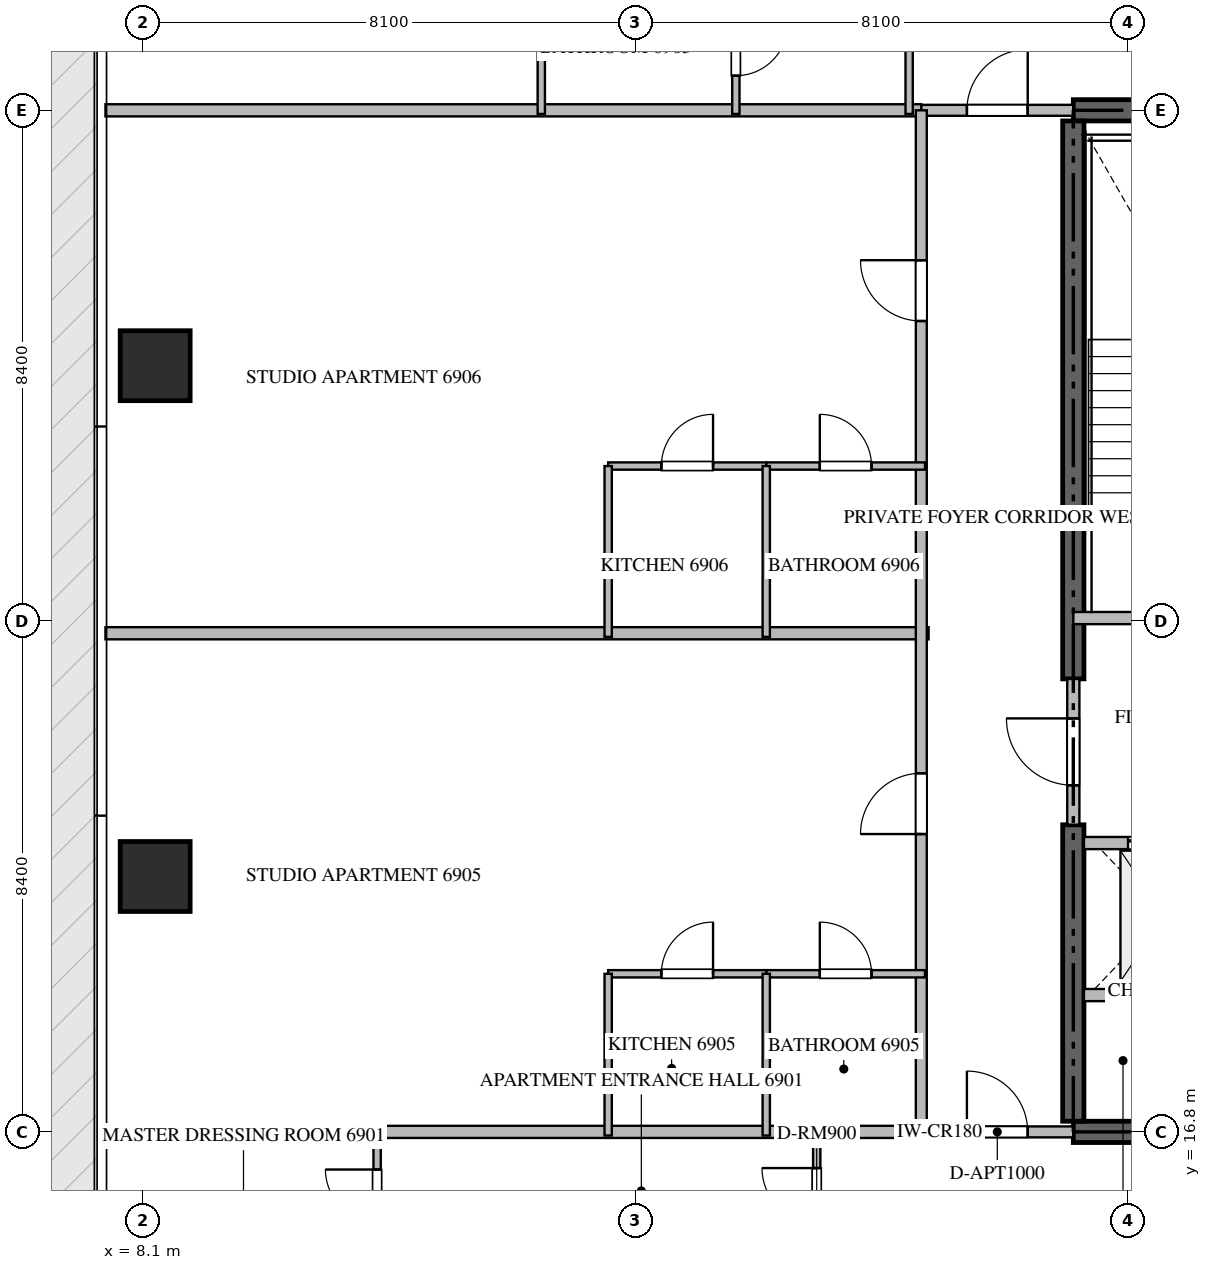
"""IFC4 building model, lengths in metres.
Left out: names, types, materials, properties, quantities, classifications, styles, units other than length and angle.
Written with IfcOpenShell. Run it as: python <this file> out.ifc"""

import sys

from ifc_helpers import new_model, si_unit, direction, frame, frame_2d, origin, origin_2d, place, context, subcontext, project, spatial, rectangle, extrude, source, transform, mapped, element, fill, save


model = new_model("IFC4")
c1 = context("Model", 3, precision=1e-05, world=origin(), true_north=direction((0.0, 1.0)))
c2 = subcontext(c1, "Body", "Model", "MODEL_VIEW")
j1 = project(units=[si_unit("LENGTHUNIT", "METRE"), si_unit("PLANEANGLEUNIT", "RADIAN")], contexts=[c1])
p1 = place(None, origin())
s1 = spatial("IfcSite", under=j1, at=p1, CompositionType="ELEMENT")
p2 = place(p1, origin())
s2 = spatial("IfcBuilding", under=s1, at=p2, CompositionType="ELEMENT")
p3 = place(p2, frame((0.0, 0.0, 275.9)))
s3 = spatial("IfcBuildingStorey", under=s2, at=p3, CompositionType="ELEMENT", Elevation=275.9)
for number, where, z_axis, x_axis in (
    (1, (23.4, 16.8, -0.26), (0.0, 0.0, 1.0), (1.0, 0.0, 0.0)),
    (2, (41.4, 33.6, -0.26), (0.0, 0.0, 1.0), (-1.0, 0.0, 0.0)),
):
    element("IfcWall", number, at=place(p3, frame(where, z_axis=z_axis, x_axis=x_axis)), inside=s3, PredefinedType="SHEAR", context=c2, shape_type="SweptSolid", body=[
        extrude(rectangle(XDim=18.0, YDim=0.35, at=frame_2d((9.0, 0.0))), origin(), (0.0, 0.0, 1.0), 3.848),
    ])
p4 = place(p3, frame((23.4, 16.975, -0.26), z_axis=(0.0, 0.0, 1.0), x_axis=(0.0, 1.0, 0.0)))
e3 = element("IfcWall", 3, at=p4, inside=s3, PredefinedType="SHEAR", context=c2, shape_type="SweptSolid", body=[
    extrude(rectangle(XDim=4.875, YDim=0.35, at=frame_2d((2.438, 0.0))), origin(), (0.0, 0.0, 1.0), 3.848),
])
p5 = place(p3, frame((23.4, 24.25, -0.26), z_axis=(0.0, 0.0, 1.0), x_axis=(0.0, 1.0, 0.0)))
e4 = element("IfcWall", 4, at=p5, inside=s3, PredefinedType="SHEAR", context=c2, shape_type="SweptSolid", body=[
    extrude(rectangle(XDim=9.175, YDim=0.35, at=frame_2d((4.587, 0.0))), origin(), (0.0, 0.0, 1.0), 3.848),
])
m1 = source(origin(), c2, "Body", "SweptSolid", [
    extrude(rectangle(XDim=1.15, YDim=1.15, at=origin_2d()), origin(), (0.0, 0.0, 1.0), 3.85),
])
for number, where, z_axis, x_axis in (
    (5, (8.3, 21.0, -0.26), (0.0, 0.0, 1.0), (1.0, 0.0, 0.0)),
    (6, (8.3, 29.4, -0.26), (0.0, 0.0, 1.0), (1.0, 0.0, 0.0)),
):
    element("IfcColumn", number, at=place(p3, frame(where, z_axis=z_axis, x_axis=x_axis)), inside=s3, PredefinedType="COLUMN", context=c2, shape_type="MappedRepresentation", body=[
        mapped(m1, transform((0.0, 0.0, 0.0), scale=1.0)),
    ])
p6 = place(p3, frame((23.4, 25.25, 0.0), z_axis=(0.0, 0.0, 1.0), x_axis=(1.0, 0.0, 0.0)))
e7 = element("IfcWall", 7, at=p6, inside=s3, PredefinedType="STANDARD", context=c2, shape_type="SweptSolid", body=[
    extrude(rectangle(XDim=4.45, YDim=0.2, at=frame_2d((2.225, 0.0))), origin(), (0.0, 0.0, 1.0), 3.59),
])
p7 = place(p6, frame((1.65, 0.0, 0.0)))
e8 = element("IfcOpeningElement", 8, at=p7, cuts=e7, PredefinedType="OPENING", context=c2, shape_type="SweptSolid", body=[
    extrude(rectangle(XDim=1.1, YDim=2.15, at=frame_2d((0.55, 1.075))), frame((0.0, 0.11, 0.0), z_axis=(0.0, -1.0, 0.0), x_axis=(1.0, 0.0, 0.0)), (0.0, 0.0, 1.0), 0.22),
])
p8 = place(p3, frame((23.575, 21.55, 0.0), z_axis=(0.0, 0.0, 1.0), x_axis=(1.0, 0.0, 0.0)))
e9 = element("IfcWall", 9, at=p8, inside=s3, PredefinedType="STANDARD", context=c2, shape_type="SweptSolid", body=[
    extrude(rectangle(XDim=2.475, YDim=0.2, at=frame_2d((1.238, 0.0))), origin(), (0.0, 0.0, 1.0), 3.59),
])
p9 = place(p8, frame((0.725, 0.0, 0.0)))
e10 = element("IfcOpeningElement", 10, at=p9, cuts=e9, PredefinedType="OPENING", context=c2, shape_type="SweptSolid", body=[
    extrude(rectangle(XDim=1.2, YDim=2.2, at=frame_2d((0.6, 1.1))), frame((0.0, 0.11, 0.0), z_axis=(0.0, -1.0, 0.0), x_axis=(1.0, 0.0, 0.0)), (0.0, 0.0, 1.0), 0.22),
])
p10 = place(p3, frame((23.575, 19.05, 0.0), z_axis=(0.0, 0.0, 1.0), x_axis=(1.0, 0.0, 0.0)))
e11 = element("IfcWall", 11, at=p10, inside=s3, PredefinedType="STANDARD", context=c2, shape_type="SweptSolid", body=[
    extrude(rectangle(XDim=2.475, YDim=0.2, at=frame_2d((1.238, 0.0))), origin(), (0.0, 0.0, 1.0), 3.59),
])
p11 = place(p3, frame((23.4, 21.852, 0.0), z_axis=(0.0, 0.0, 1.0), x_axis=(0.0, 1.0, 0.0)))
e12 = element("IfcWall", 12, at=p11, inside=s3, PredefinedType="STANDARD", context=c2, shape_type="SweptSolid", body=[
    extrude(rectangle(XDim=2.396, YDim=0.2, at=frame_2d((1.198, 0.0))), origin(), (0.0, 0.0, 1.0), 3.59),
])
p12 = place(p11, frame((0.648, 0.0, 0.0)))
e13 = element("IfcOpeningElement", 13, at=p12, cuts=e12, PredefinedType="OPENING", context=c2, shape_type="SweptSolid", body=[
    extrude(rectangle(XDim=1.1, YDim=2.15, at=frame_2d((0.55, 1.075))), frame((0.0, 0.11, 0.0), z_axis=(0.0, -1.0, 0.0), x_axis=(1.0, 0.0, 0.0)), (0.0, 0.0, 1.0), 0.22),
])
p13 = place(p3, frame((7.482, 25.0, 0.0), z_axis=(0.0, 0.0, 1.0), x_axis=(1.0, 0.0, 0.0)))
e14 = element("IfcWall", 14, at=p13, inside=s3, PredefinedType="PARTITIONING", context=c2, shape_type="SweptSolid", body=[
    extrude(rectangle(XDim=13.538, YDim=0.2, at=frame_2d((6.769, 0.0))), origin(), (0.0, 0.0, 1.0), 3.59),
])
for number, where, z_axis, x_axis in (
    (15, (7.482, 16.8, 0.0), (0.0, 0.0, 1.0), (1.0, 0.0, 0.0)),
    (16, (7.482, 33.6, 0.0), (0.0, 0.0, 1.0), (1.0, 0.0, 0.0)),
):
    element("IfcWall", number, at=place(p3, frame(where, z_axis=z_axis, x_axis=x_axis)), inside=s3, PredefinedType="PARTITIONING", context=c2, shape_type="SweptSolid", body=[
        extrude(rectangle(XDim=13.418, YDim=0.2, at=frame_2d((6.709, 0.0))), origin(), (0.0, 0.0, 1.0), 3.59),
    ])
p14 = place(p3, frame((20.902, 16.8, 0.0), z_axis=(0.0, 0.0, 1.0), x_axis=(1.0, 0.0, 0.0)))
e17 = element("IfcWall", 17, at=p14, inside=s3, PredefinedType="PARTITIONING", context=c2, shape_type="SweptSolid", body=[
    extrude(rectangle(XDim=2.496, YDim=0.18, at=frame_2d((1.248, 0.0))), origin(), (0.0, 0.0, 1.0), 3.59),
])
p15 = place(p14, frame((0.748, 0.0, 0.0)))
e18 = element("IfcOpeningElement", 18, at=p15, cuts=e17, PredefinedType="OPENING", context=c2, shape_type="SweptSolid", body=[
    extrude(rectangle(XDim=1.0, YDim=2.15, at=frame_2d((0.5, 1.075))), frame((0.0, 0.1, 0.0), z_axis=(0.0, -1.0, 0.0), x_axis=(1.0, 0.0, 0.0)), (0.0, 0.0, 1.0), 0.2),
])
p16 = place(p3, frame((20.902, 33.6, 0.0), z_axis=(0.0, 0.0, 1.0), x_axis=(1.0, 0.0, 0.0)))
e19 = element("IfcWall", 19, at=p16, inside=s3, PredefinedType="PARTITIONING", context=c2, shape_type="SweptSolid", body=[
    extrude(rectangle(XDim=2.496, YDim=0.18, at=frame_2d((1.248, 0.0))), origin(), (0.0, 0.0, 1.0), 3.59),
])
p17 = place(p16, frame((0.748, 0.0, 0.0)))
e20 = element("IfcOpeningElement", 20, at=p17, cuts=e19, PredefinedType="OPENING", context=c2, shape_type="SweptSolid", body=[
    extrude(rectangle(XDim=1.0, YDim=2.15, at=frame_2d((0.5, 1.075))), frame((0.0, 0.1, 0.0), z_axis=(0.0, -1.0, 0.0), x_axis=(1.0, 0.0, 0.0)), (0.0, 0.0, 1.0), 0.2),
])
p18 = place(p3, frame((20.9, 16.8, 0.0), z_axis=(0.0, 0.0, 1.0), x_axis=(0.0, 1.0, 0.0)))
e21 = element("IfcWall", 21, at=p18, inside=s3, PredefinedType="PARTITIONING", context=c2, shape_type="SweptSolid", body=[
    extrude(rectangle(XDim=16.8, YDim=0.18, at=frame_2d((8.4, 0.0))), origin(), (0.0, 0.0, 1.0), 3.59),
])
p19 = place(p18, frame((4.898, 0.0, 0.0)))
e22 = element("IfcOpeningElement", 22, at=p19, cuts=e21, PredefinedType="OPENING", context=c2, shape_type="SweptSolid", body=[
    extrude(rectangle(XDim=1.0, YDim=2.15, at=frame_2d((0.5, 1.075))), frame((0.0, 0.1, 0.0), z_axis=(0.0, -1.0, 0.0), x_axis=(1.0, 0.0, 0.0)), (0.0, 0.0, 1.0), 0.2),
])
p20 = place(p18, frame((13.335, 0.0, 0.0)))
e23 = element("IfcOpeningElement", 23, at=p20, cuts=e21, PredefinedType="OPENING", context=c2, shape_type="SweptSolid", body=[
    extrude(rectangle(XDim=1.0, YDim=2.15, at=frame_2d((0.5, 1.075))), frame((0.0, 0.1, 0.0), z_axis=(0.0, -1.0, 0.0), x_axis=(1.0, 0.0, 0.0)), (0.0, 0.0, 1.0), 0.2),
])
p21 = place(p3, frame((19.18, 14.65, 0.0), z_axis=(0.0, 0.0, 1.0), x_axis=(0.0, 1.0, 0.0)))
e24 = element("IfcWall", 24, at=p21, inside=s3, PredefinedType="PARTITIONING", context=c2, shape_type="SweptSolid", body=[
    extrude(rectangle(XDim=2.21, YDim=0.12, at=frame_2d((1.105, 0.0))), origin(), (0.0, 0.0, 1.0), 3.59),
])
p22 = place(p21, frame((0.655, 0.0, 0.0)))
e25 = element("IfcOpeningElement", 25, at=p22, cuts=e24, PredefinedType="OPENING", context=c2, shape_type="SweptSolid", body=[
    extrude(rectangle(XDim=0.9, YDim=2.1, at=frame_2d((0.45, 1.05))), frame((0.0, 0.07, 0.0), z_axis=(0.0, -1.0, 0.0), x_axis=(1.0, 0.0, 0.0)), (0.0, 0.0, 1.0), 0.14),
])
p23 = place(p3, frame((11.95, 14.652, 0.0), z_axis=(0.0, 0.0, 1.0), x_axis=(0.0, 1.0, 0.0)))
e26 = element("IfcWall", 26, at=p23, inside=s3, PredefinedType="PARTITIONING", context=c2, shape_type="SweptSolid", body=[
    extrude(rectangle(XDim=2.208, YDim=0.12, at=frame_2d((1.104, 0.0))), origin(), (0.0, 0.0, 1.0), 3.59),
])
p24 = place(p23, frame((0.679, 0.0, 0.0)))
e27 = element("IfcOpeningElement", 27, at=p24, cuts=e26, PredefinedType="OPENING", context=c2, shape_type="SweptSolid", body=[
    extrude(rectangle(XDim=0.85, YDim=2.1, at=frame_2d((0.425, 1.05))), frame((0.0, 0.07, 0.0), z_axis=(0.0, -1.0, 0.0), x_axis=(1.0, 0.0, 0.0)), (0.0, 0.0, 1.0), 0.14),
])
p25 = place(p3, frame((20.7, 36.35, 0.0), z_axis=(0.0, 0.0, 1.0), x_axis=(0.0, -1.0, 0.0)))
e28 = element("IfcWall", 28, at=p25, inside=s3, PredefinedType="PARTITIONING", context=c2, shape_type="SweptSolid", body=[
    extrude(rectangle(XDim=2.81, YDim=0.12, at=frame_2d((1.405, 0.0))), origin(), (0.0, 0.0, 1.0), 3.59),
])
p26 = place(p3, frame((14.65, 35.65, 0.0), z_axis=(0.0, 0.0, 1.0), x_axis=(0.0, -1.0, 0.0)))
e29 = element("IfcWall", 29, at=p26, inside=s3, PredefinedType="PARTITIONING", context=c2, shape_type="SweptSolid", body=[
    extrude(rectangle(XDim=2.11, YDim=0.12, at=frame_2d((1.055, 0.0))), origin(), (0.0, 0.0, 1.0), 3.59),
])
p27 = place(p3, frame((17.85, 35.648, 0.0), z_axis=(0.0, 0.0, 1.0), x_axis=(0.0, -1.0, 0.0)))
e30 = element("IfcWall", 30, at=p27, inside=s3, PredefinedType="PARTITIONING", context=c2, shape_type="SweptSolid", body=[
    extrude(rectangle(XDim=2.108, YDim=0.12, at=frame_2d((1.054, 0.0))), origin(), (0.0, 0.0, 1.0), 3.59),
])
p28 = place(p27, frame((0.629, 0.0, 0.0)))
e31 = element("IfcOpeningElement", 31, at=p28, cuts=e30, PredefinedType="OPENING", context=c2, shape_type="SweptSolid", body=[
    extrude(rectangle(XDim=0.85, YDim=2.1, at=frame_2d((0.425, 1.05))), frame((0.0, 0.07, 0.0), z_axis=(0.0, -1.0, 0.0), x_axis=(1.0, 0.0, 0.0)), (0.0, 0.0, 1.0), 0.14),
])
p29 = place(p3, frame((15.75, 19.4, 0.0), z_axis=(0.0, 0.0, 1.0), x_axis=(1.0, 0.0, 0.0)))
e32 = element("IfcWall", 32, at=p29, inside=s3, PredefinedType="PARTITIONING", context=c2, shape_type="SweptSolid", body=[
    extrude(rectangle(XDim=2.6, YDim=0.12, at=frame_2d((1.3, 0.0))), origin(), (0.0, 0.0, 1.0), 3.59),
])
p30 = place(p29, frame((0.875, 0.0, 0.0)))
e33 = element("IfcOpeningElement", 33, at=p30, cuts=e32, PredefinedType="OPENING", context=c2, shape_type="SweptSolid", body=[
    extrude(rectangle(XDim=0.85, YDim=2.1, at=frame_2d((0.425, 1.05))), frame((0.0, 0.07, 0.0), z_axis=(0.0, -1.0, 0.0), x_axis=(1.0, 0.0, 0.0)), (0.0, 0.0, 1.0), 0.14),
])
p31 = place(p3, frame((18.352, 19.4, 0.0), z_axis=(0.0, 0.0, 1.0), x_axis=(1.0, 0.0, 0.0)))
e34 = element("IfcWall", 34, at=p31, inside=s3, PredefinedType="PARTITIONING", context=c2, shape_type="SweptSolid", body=[
    extrude(rectangle(XDim=2.608, YDim=0.12, at=frame_2d((1.304, 0.0))), origin(), (0.0, 0.0, 1.0), 3.59),
])
p32 = place(p31, frame((0.879, 0.0, 0.0)))
e35 = element("IfcOpeningElement", 35, at=p32, cuts=e34, PredefinedType="OPENING", context=c2, shape_type="SweptSolid", body=[
    extrude(rectangle(XDim=0.85, YDim=2.1, at=frame_2d((0.425, 1.05))), frame((0.0, 0.07, 0.0), z_axis=(0.0, -1.0, 0.0), x_axis=(1.0, 0.0, 0.0)), (0.0, 0.0, 1.0), 0.14),
])
for number, where, z_axis, x_axis in (
    (36, (18.35, 16.74, 0.0), (0.0, 0.0, 1.0), (0.0, 1.0, 0.0)),
    (37, (15.75, 16.74, 0.0), (0.0, 0.0, 1.0), (0.0, 1.0, 0.0)),
):
    element("IfcWall", number, at=place(p3, frame(where, z_axis=z_axis, x_axis=x_axis)), inside=s3, PredefinedType="PARTITIONING", context=c2, shape_type="SweptSolid", body=[
        extrude(rectangle(XDim=2.66, YDim=0.12, at=frame_2d((1.33, 0.0))), origin(), (0.0, 0.0, 1.0), 3.59),
    ])
p33 = place(p3, frame((15.75, 27.75, 0.0), z_axis=(0.0, 0.0, 1.0), x_axis=(1.0, 0.0, 0.0)))
e38 = element("IfcWall", 38, at=p33, inside=s3, PredefinedType="PARTITIONING", context=c2, shape_type="SweptSolid", body=[
    extrude(rectangle(XDim=2.6, YDim=0.12, at=frame_2d((1.3, 0.0))), origin(), (0.0, 0.0, 1.0), 3.59),
])
p34 = place(p33, frame((0.875, 0.0, 0.0)))
e39 = element("IfcOpeningElement", 39, at=p34, cuts=e38, PredefinedType="OPENING", context=c2, shape_type="SweptSolid", body=[
    extrude(rectangle(XDim=0.85, YDim=2.1, at=frame_2d((0.425, 1.05))), frame((0.0, 0.07, 0.0), z_axis=(0.0, -1.0, 0.0), x_axis=(1.0, 0.0, 0.0)), (0.0, 0.0, 1.0), 0.14),
])
p35 = place(p3, frame((18.352, 27.75, 0.0), z_axis=(0.0, 0.0, 1.0), x_axis=(1.0, 0.0, 0.0)))
e40 = element("IfcWall", 40, at=p35, inside=s3, PredefinedType="PARTITIONING", context=c2, shape_type="SweptSolid", body=[
    extrude(rectangle(XDim=2.608, YDim=0.12, at=frame_2d((1.304, 0.0))), origin(), (0.0, 0.0, 1.0), 3.59),
])
p36 = place(p35, frame((0.879, 0.0, 0.0)))
e41 = element("IfcOpeningElement", 41, at=p36, cuts=e40, PredefinedType="OPENING", context=c2, shape_type="SweptSolid", body=[
    extrude(rectangle(XDim=0.85, YDim=2.1, at=frame_2d((0.425, 1.05))), frame((0.0, 0.07, 0.0), z_axis=(0.0, -1.0, 0.0), x_axis=(1.0, 0.0, 0.0)), (0.0, 0.0, 1.0), 0.14),
])
for number, where, z_axis, x_axis in (
    (42, (18.35, 24.94, 0.0), (0.0, 0.0, 1.0), (0.0, 1.0, 0.0)),
    (43, (15.75, 24.94, 0.0), (0.0, 0.0, 1.0), (0.0, 1.0, 0.0)),
):
    element("IfcWall", number, at=place(p3, frame(where, z_axis=z_axis, x_axis=x_axis)), inside=s3, PredefinedType="PARTITIONING", context=c2, shape_type="SweptSolid", body=[
        extrude(rectangle(XDim=2.81, YDim=0.12, at=frame_2d((1.405, 0.0))), origin(), (0.0, 0.0, 1.0), 3.59),
    ])
m2 = source(origin(), c2, "Body", "SweptSolid", [
    extrude(rectangle(XDim=1.2, YDim=2.2, at=frame_2d((0.6, 1.1))), frame((0.0, 0.025, 0.0), z_axis=(0.0, -1.0, 0.0), x_axis=(1.0, 0.0, 0.0)), (0.0, 0.0, 1.0), 0.05),
])
p37 = place(p9, origin())
e44 = element("IfcDoor", 44, at=p37, inside=s3, OperationType="DOUBLE_DOOR_SLIDING", PredefinedType="DOOR", context=c2, shape_type="MappedRepresentation", body=[
    mapped(m2, transform((0.0, 0.0, 0.0), scale=1.0)),
])
fill(e10, e44)
m3 = source(origin(), c2, "Body", "SweptSolid", [
    extrude(rectangle(XDim=1.1, YDim=2.15, at=frame_2d((0.55, 1.075))), frame((0.0, 0.025, 0.0), z_axis=(0.0, -1.0, 0.0), x_axis=(1.0, 0.0, 0.0)), (0.0, 0.0, 1.0), 0.05),
])
p38 = place(p12, origin())
e45 = element("IfcDoor", 45, at=p38, inside=s3, OperationType="SINGLE_SWING_RIGHT", PredefinedType="DOOR", context=c2, shape_type="MappedRepresentation", body=[
    mapped(m3, transform((0.0, 0.0, 0.0), scale=1.0)),
])
fill(e13, e45)
m4 = source(origin(), c2, "Body", "SweptSolid", [
    extrude(rectangle(XDim=1.0, YDim=2.15, at=frame_2d((0.5, 1.075))), frame((0.0, 0.025, 0.0), z_axis=(0.0, -1.0, 0.0), x_axis=(1.0, 0.0, 0.0)), (0.0, 0.0, 1.0), 0.05),
])
p39 = place(p15, origin())
e46 = element("IfcDoor", 46, at=p39, inside=s3, OperationType="SINGLE_SWING_LEFT", PredefinedType="DOOR", context=c2, shape_type="MappedRepresentation", body=[
    mapped(m4, transform((0.0, 0.0, 0.0), scale=1.0)),
])
fill(e18, e46)
p40 = place(p17, origin())
e47 = element("IfcDoor", 47, at=p40, inside=s3, OperationType="SINGLE_SWING_RIGHT", PredefinedType="DOOR", context=c2, shape_type="MappedRepresentation", body=[
    mapped(m4, transform((0.0, 0.0, 0.0), scale=1.0)),
])
fill(e20, e47)
p41 = place(p19, origin())
e48 = element("IfcDoor", 48, at=p41, inside=s3, OperationType="SINGLE_SWING_LEFT", PredefinedType="DOOR", context=c2, shape_type="MappedRepresentation", body=[
    mapped(m4, transform((0.0, 0.0, 0.0), scale=1.0)),
])
fill(e22, e48)
p42 = place(p20, origin())
e49 = element("IfcDoor", 49, at=p42, inside=s3, OperationType="SINGLE_SWING_RIGHT", PredefinedType="DOOR", context=c2, shape_type="MappedRepresentation", body=[
    mapped(m4, transform((0.0, 0.0, 0.0), scale=1.0)),
])
fill(e23, e49)
m5 = source(origin(), c2, "Body", "SweptSolid", [
    extrude(rectangle(XDim=0.9, YDim=2.1, at=frame_2d((0.45, 1.05))), frame((0.0, 0.025, 0.0), z_axis=(0.0, -1.0, 0.0), x_axis=(1.0, 0.0, 0.0)), (0.0, 0.0, 1.0), 0.05),
])
p43 = place(p22, origin())
e50 = element("IfcDoor", 50, at=p43, inside=s3, OperationType="SINGLE_SWING_RIGHT", PredefinedType="DOOR", context=c2, shape_type="MappedRepresentation", body=[
    mapped(m5, transform((0.0, 0.0, 0.0), scale=1.0)),
])
fill(e25, e50)
m6 = source(origin(), c2, "Body", "SweptSolid", [
    extrude(rectangle(XDim=0.85, YDim=2.1, at=frame_2d((0.425, 1.05))), frame((0.0, 0.025, 0.0), z_axis=(0.0, -1.0, 0.0), x_axis=(1.0, 0.0, 0.0)), (0.0, 0.0, 1.0), 0.05),
])
p44 = place(p24, origin())
e51 = element("IfcDoor", 51, at=p44, inside=s3, OperationType="SINGLE_SWING_RIGHT", PredefinedType="DOOR", context=c2, shape_type="MappedRepresentation", body=[
    mapped(m6, transform((0.0, 0.0, 0.0), scale=1.0)),
])
fill(e27, e51)
p45 = place(p28, origin())
e52 = element("IfcDoor", 52, at=p45, inside=s3, OperationType="SINGLE_SWING_LEFT", PredefinedType="DOOR", context=c2, shape_type="MappedRepresentation", body=[
    mapped(m6, transform((0.0, 0.0, 0.0), scale=1.0)),
])
fill(e31, e52)
p46 = place(p30, origin())
e53 = element("IfcDoor", 53, at=p46, inside=s3, OperationType="SINGLE_SWING_RIGHT", PredefinedType="DOOR", context=c2, shape_type="MappedRepresentation", body=[
    mapped(m6, transform((0.0, 0.0, 0.0), scale=1.0)),
])
fill(e33, e53)
p47 = place(p32, origin())
e54 = element("IfcDoor", 54, at=p47, inside=s3, OperationType="SINGLE_SWING_LEFT", PredefinedType="DOOR", context=c2, shape_type="MappedRepresentation", body=[
    mapped(m6, transform((0.0, 0.0, 0.0), scale=1.0)),
])
fill(e35, e54)
p48 = place(p34, origin())
e55 = element("IfcDoor", 55, at=p48, inside=s3, OperationType="SINGLE_SWING_RIGHT", PredefinedType="DOOR", context=c2, shape_type="MappedRepresentation", body=[
    mapped(m6, transform((0.0, 0.0, 0.0), scale=1.0)),
])
fill(e39, e55)
p49 = place(p36, origin())
e56 = element("IfcDoor", 56, at=p49, inside=s3, OperationType="SINGLE_SWING_LEFT", PredefinedType="DOOR", context=c2, shape_type="MappedRepresentation", body=[
    mapped(m6, transform((0.0, 0.0, 0.0), scale=1.0)),
])
fill(e41, e56)
save(model, sys.argv[1])
